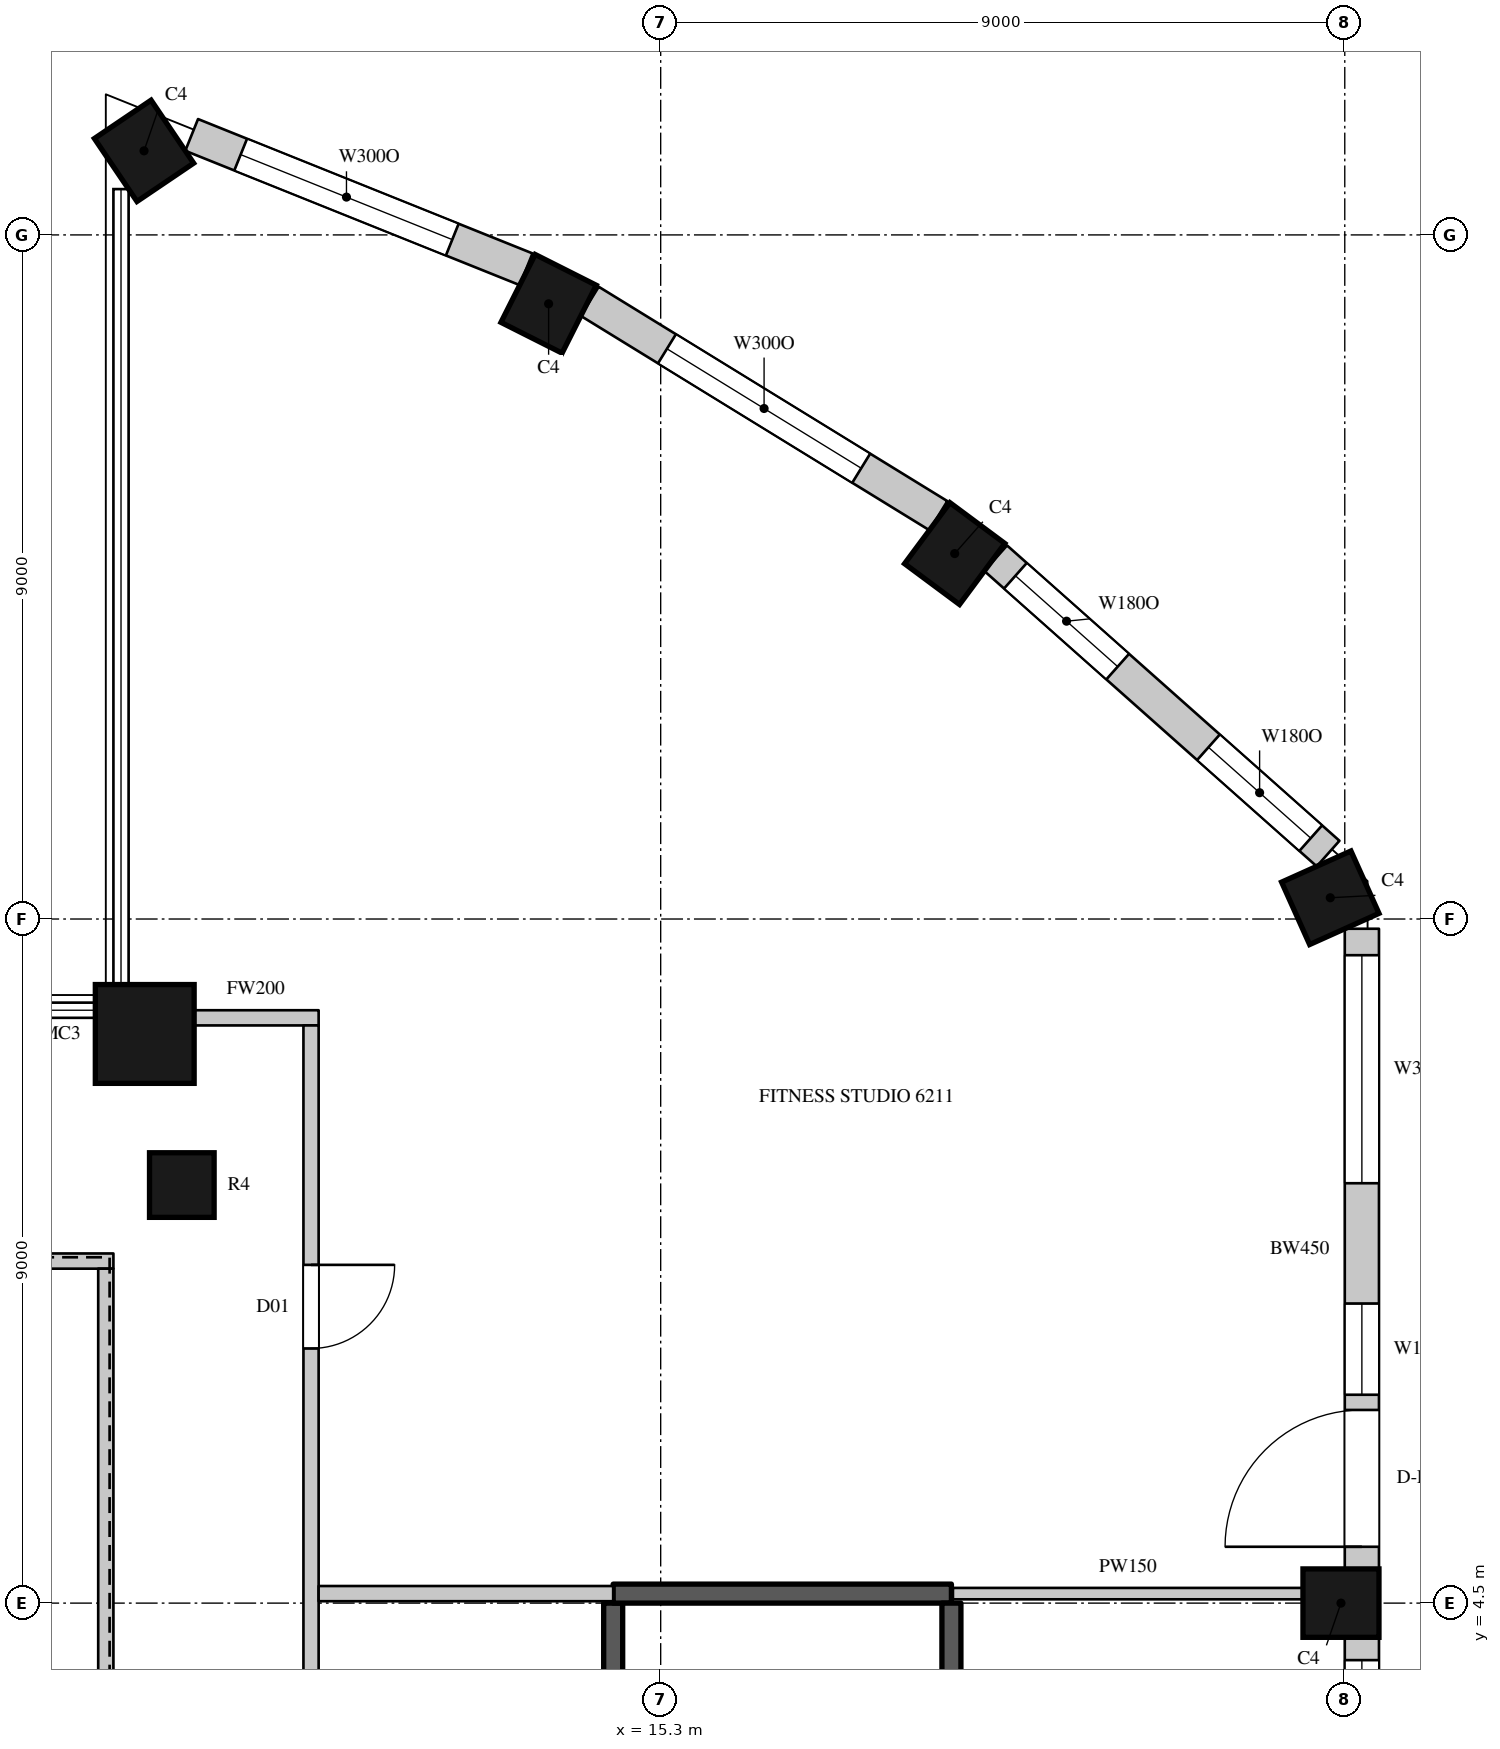
"""IFC4 building model, lengths in metres.
Left out: names, types, materials, properties, quantities, classifications, styles, units other than length and angle.
Written with IfcOpenShell. Run it as: python <this file> out.ifc"""

import sys

from ifc_helpers import new_model, si_unit, direction, frame, frame_2d, origin, origin_2d, place, context, subcontext, project, spatial, rectangle, circle, extrude, element, fill, save


model = new_model("IFC4")
c1 = context("Model", 3, precision=1e-05, world=origin(), true_north=direction((0.0, 1.0)))
c2 = subcontext(c1, "Body", "Model", "MODEL_VIEW")
j1 = project(units=[si_unit("LENGTHUNIT", "METRE"), si_unit("PLANEANGLEUNIT", "RADIAN")], contexts=[c1])
p1 = place(None, origin())
s1 = spatial("IfcSite", under=j1, at=p1, CompositionType="ELEMENT")
p2 = place(p1, origin())
s2 = spatial("IfcBuilding", under=s1, at=p2, CompositionType="ELEMENT")
p3 = place(p2, frame((0.0, 0.0, 276.2)))
s3 = spatial("IfcBuildingStorey", under=s2, at=p3, CompositionType="ELEMENT", Elevation=276.2)
p4 = place(p3, frame((8.503, 23.606, 0.0), z_axis=(0.0, 0.0, 1.0), x_axis=(-0.828469606019, -0.560034027451, 0.0)))
e1 = element("IfcColumn", 1, at=p4, inside=s3, PredefinedType="COLUMN", context=c2, shape_type="SweptSolid", body=[
    extrude(rectangle(XDim=0.9, YDim=1.0, at=origin_2d()), origin(), (0.0, 0.0, 1.0), 4.1),
])
p5 = place(p3, frame((8.512, 11.988, 0.0), z_axis=(0.0, 0.0, 1.0), x_axis=(1.0, 0.0, 0.0)))
e2 = element("IfcColumn", 2, at=p5, inside=s3, PredefinedType="COLUMN", context=c2, shape_type="SweptSolid", body=[
    extrude(circle(Radius=0.65, at=origin_2d()), origin(), (0.0, 0.0, 1.0), 4.1),
])
for number, where, z_axis, x_axis in (
    (3, (24.25, 4.5, 0.0), (0.0, 0.0, 1.0), (0.0, 1.0, 0.0)),
    (4, (24.11, 13.78, 0.0), (0.0, 0.0, 1.0), (-0.41, 0.912, 0.0)),
    (5, (19.168, 18.308, 0.0), (0.0, 0.0, 1.0), (-0.803, 0.596, 0.0)),
    (6, (13.826, 21.594, 0.0), (0.0, 0.0, 1.0), (-0.893, 0.45, 0.0)),
):
    element("IfcColumn", number, at=place(p3, frame(where, z_axis=z_axis, x_axis=x_axis)), inside=s3, PredefinedType="COLUMN", context=c2, shape_type="SweptSolid", body=[
        extrude(rectangle(XDim=0.9, YDim=1.0, at=origin_2d()), origin(), (0.0, 0.0, 1.0), 4.1),
    ])
p6 = place(p3, frame((9.0, 10.0, 0.0), z_axis=(0.0, 0.0, 1.0), x_axis=(1.0, 0.0, 0.0)))
e7 = element("IfcColumn", 7, at=p6, inside=s3, PredefinedType="COLUMN", context=c2, shape_type="SweptSolid", body=[
    extrude(circle(Radius=0.425, at=origin_2d()), origin(), (0.0, 0.0, 1.0), 4.1),
])
p7 = place(p3, frame((24.525, -4.05, 0.0), z_axis=(0.0, 0.0, 1.0), x_axis=(0.0, 1.0, 0.0)))
e8 = element("IfcWall", 8, at=p7, inside=s3, PredefinedType="SOLIDWALL", context=c2, shape_type="SweptSolid", body=[
    extrude(rectangle(XDim=8.1, YDim=0.45, at=frame_2d((4.05, 0.0))), origin(), (0.0, 0.0, 1.0), 3.8),
])
p8 = place(p7, frame((0.3, 0.0, 1.05)))
e9 = element("IfcOpeningElement", 9, at=p8, cuts=e8, PredefinedType="OPENING", context=c2, shape_type="SweptSolid", body=[
    extrude(rectangle(XDim=3.0, YDim=2.4, at=frame_2d((1.5, 1.2))), frame((0.0, 0.235, 0.0), z_axis=(0.0, -1.0, 0.0), x_axis=(1.0, 0.0, 0.0)), (0.0, 0.0, 1.0), 0.47),
])
p9 = place(p7, frame((4.8, 0.0, 1.05)))
e10 = element("IfcOpeningElement", 10, at=p9, cuts=e8, PredefinedType="OPENING", context=c2, shape_type="SweptSolid", body=[
    extrude(rectangle(XDim=3.0, YDim=2.4, at=frame_2d((1.5, 1.2))), frame((0.0, 0.235, 0.0), z_axis=(0.0, -1.0, 0.0), x_axis=(1.0, 0.0, 0.0)), (0.0, 0.0, 1.0), 0.47),
])
p10 = place(p3, frame((24.525, 4.95, 0.0), z_axis=(0.0, 0.0, 1.0), x_axis=(0.0, 1.0, 0.0)))
e11 = element("IfcWall", 11, at=p10, inside=s3, PredefinedType="SOLIDWALL", context=c2, shape_type="SweptSolid", body=[
    extrude(rectangle(XDim=8.422, YDim=0.45, at=frame_2d((4.211, 0.0))), origin(), (0.0, 0.0, 1.0), 3.8),
])
p11 = place(p10, frame((0.291, 0.0, 0.0)))
e12 = element("IfcOpeningElement", 12, at=p11, cuts=e11, PredefinedType="OPENING", context=c2, shape_type="SweptSolid", body=[
    extrude(rectangle(XDim=1.8, YDim=2.4, at=frame_2d((0.9, 1.2))), frame((0.0, 0.235, 0.0), z_axis=(0.0, -1.0, 0.0), x_axis=(1.0, 0.0, 0.0)), (0.0, 0.0, 1.0), 0.47),
])
p12 = place(p10, frame((2.291, 0.0, 1.05)))
e13 = element("IfcOpeningElement", 13, at=p12, cuts=e11, PredefinedType="OPENING", context=c2, shape_type="SweptSolid", body=[
    extrude(rectangle(XDim=1.2, YDim=2.4, at=frame_2d((0.6, 1.2))), frame((0.0, 0.235, 0.0), z_axis=(0.0, -1.0, 0.0), x_axis=(1.0, 0.0, 0.0)), (0.0, 0.0, 1.0), 0.47),
])
p13 = place(p10, frame((5.074, 0.0, 1.05)))
e14 = element("IfcOpeningElement", 14, at=p13, cuts=e11, PredefinedType="OPENING", context=c2, shape_type="SweptSolid", body=[
    extrude(rectangle(XDim=3.0, YDim=2.4, at=frame_2d((1.5, 1.2))), frame((0.0, 0.235, 0.0), z_axis=(0.0, -1.0, 0.0), x_axis=(1.0, 0.0, 0.0)), (0.0, 0.0, 1.0), 0.47),
])
p14 = place(p3, frame((24.081, 14.361, 0.0), z_axis=(0.0, 0.0, 1.0), x_axis=(-0.747570482973, 0.664182484704, 0.0)))
e15 = element("IfcWall", 15, at=p14, inside=s3, PredefinedType="SOLIDWALL", context=c2, shape_type="SweptSolid", body=[
    extrude(rectangle(XDim=5.85, YDim=0.45, at=frame_2d((2.925, 0.0))), origin(), (0.0, 0.0, 1.0), 3.8),
])
p15 = place(p14, frame((0.305, 0.0, 1.05)))
e16 = element("IfcOpeningElement", 16, at=p15, cuts=e15, PredefinedType="OPENING", context=c2, shape_type="SweptSolid", body=[
    extrude(rectangle(XDim=1.8, YDim=2.4, at=frame_2d((0.9, 1.2))), frame((0.0, 0.235, 0.0), z_axis=(0.0, -1.0, 0.0), x_axis=(1.0, 0.0, 0.0)), (0.0, 0.0, 1.0), 0.47),
])
p16 = place(p14, frame((3.703, 0.0, 1.05)))
e17 = element("IfcOpeningElement", 17, at=p16, cuts=e15, PredefinedType="OPENING", context=c2, shape_type="SweptSolid", body=[
    extrude(rectangle(XDim=1.8, YDim=2.4, at=frame_2d((0.9, 1.2))), frame((0.0, 0.235, 0.0), z_axis=(0.0, -1.0, 0.0), x_axis=(1.0, 0.0, 0.0)), (0.0, 0.0, 1.0), 0.47),
])
p17 = place(p3, frame((18.953, 18.806, 0.0), z_axis=(0.0, 0.0, 1.0), x_axis=(-0.851860664503, 0.523768468193, 0.0)))
e18 = element("IfcWall", 18, at=p17, inside=s3, PredefinedType="SOLIDWALL", context=c2, shape_type="SweptSolid", body=[
    extrude(rectangle(XDim=5.384, YDim=0.45, at=frame_2d((2.692, 0.0))), origin(), (0.0, 0.0, 1.0), 3.8),
])
p18 = place(p17, frame((1.192, 0.0, 1.05)))
e19 = element("IfcOpeningElement", 19, at=p18, cuts=e18, PredefinedType="OPENING", context=c2, shape_type="SweptSolid", body=[
    extrude(rectangle(XDim=3.0, YDim=2.4, at=frame_2d((1.5, 1.2))), frame((0.0, 0.235, 0.0), z_axis=(0.0, -1.0, 0.0), x_axis=(1.0, 0.0, 0.0)), (0.0, 0.0, 1.0), 0.47),
])
p19 = place(p3, frame((13.529, 22.048, 0.0), z_axis=(0.0, 0.0, 1.0), x_axis=(-0.927957332619, 0.372686448424, 0.0)))
e20 = element("IfcWall", 20, at=p19, inside=s3, PredefinedType="SOLIDWALL", context=c2, shape_type="SweptSolid", body=[
    extrude(rectangle(XDim=4.741, YDim=0.45, at=frame_2d((2.371, 0.0))), origin(), (0.0, 0.0, 1.0), 3.8),
])
p20 = place(p19, frame((1.047, 0.0, 1.05)))
e21 = element("IfcOpeningElement", 21, at=p20, cuts=e20, PredefinedType="OPENING", context=c2, shape_type="SweptSolid", body=[
    extrude(rectangle(XDim=3.0, YDim=2.4, at=frame_2d((1.5, 1.2))), frame((0.0, 0.235, 0.0), z_axis=(0.0, -1.0, 0.0), x_axis=(1.0, 0.0, 0.0)), (0.0, 0.0, 1.0), 0.47),
])
p21 = place(p3, frame((-6.1, 9.0, 0.0), z_axis=(0.0, 0.0, 1.0), x_axis=(1.0, 0.0, 0.0)))
e22 = element("IfcWall", 22, at=p21, inside=s3, PredefinedType="PARTITIONING", context=c2, shape_type="SweptSolid", body=[
    extrude(rectangle(XDim=14.2, YDim=0.2, at=frame_2d((7.1, 0.0))), origin(), (0.0, 0.0, 1.0), 3.8),
])
p22 = place(p3, frame((8.0, -4.48, 0.0), z_axis=(0.0, 0.0, 1.0), x_axis=(0.0, 1.0, 0.0)))
e23 = element("IfcWall", 23, at=p22, inside=s3, PredefinedType="PARTITIONING", context=c2, shape_type="SweptSolid", body=[
    extrude(rectangle(XDim=13.38, YDim=0.2, at=frame_2d((6.69, 0.0))), origin(), (0.0, 0.0, 1.0), 3.8),
])
p23 = place(p3, frame((9.144, 12.2, 0.0), z_axis=(0.0, 0.0, 1.0), x_axis=(1.0, 0.0, 0.0)))
e24 = element("IfcWall", 24, at=p23, inside=s3, PredefinedType="PARTITIONING", context=c2, shape_type="SweptSolid", body=[
    extrude(rectangle(XDim=1.656, YDim=0.2, at=frame_2d((0.828, 0.0))), origin(), (0.0, 0.0, 1.0), 3.8),
])
p24 = place(p3, frame((10.7, -11.7, 0.0), z_axis=(0.0, 0.0, 1.0), x_axis=(0.0, 1.0, 0.0)))
e25 = element("IfcWall", 25, at=p24, inside=s3, PredefinedType="PARTITIONING", context=c2, shape_type="SweptSolid", body=[
    extrude(rectangle(XDim=23.8, YDim=0.2, at=frame_2d((11.9, 0.0))), origin(), (0.0, 0.0, 1.0), 3.8),
])
p25 = place(p24, frame((12.35, 0.0, 0.0)))
e26 = element("IfcOpeningElement", 26, at=p25, cuts=e25, PredefinedType="OPENING", context=c2, shape_type="SweptSolid", body=[
    extrude(rectangle(XDim=1.5, YDim=2.4, at=frame_2d((0.75, 1.2))), frame((0.0, 0.11, 0.0), z_axis=(0.0, -1.0, 0.0), x_axis=(1.0, 0.0, 0.0)), (0.0, 0.0, 1.0), 0.22),
])
p26 = place(p24, frame((19.55, 0.0, 0.0)))
e27 = element("IfcOpeningElement", 27, at=p26, cuts=e25, PredefinedType="OPENING", context=c2, shape_type="SweptSolid", body=[
    extrude(rectangle(XDim=1.1, YDim=2.4, at=frame_2d((0.55, 1.2))), frame((0.0, 0.11, 0.0), z_axis=(0.0, -1.0, 0.0), x_axis=(1.0, 0.0, 0.0)), (0.0, 0.0, 1.0), 0.22),
])
p27 = place(p24, frame((4.25, 0.0, 0.0)))
e28 = element("IfcOpeningElement", 28, at=p27, cuts=e25, PredefinedType="OPENING", context=c2, shape_type="SweptSolid", body=[
    extrude(rectangle(XDim=1.1, YDim=2.4, at=frame_2d((0.55, 1.2))), frame((0.0, 0.11, 0.0), z_axis=(0.0, -1.0, 0.0), x_axis=(1.0, 0.0, 0.0)), (0.0, 0.0, 1.0), 0.22),
])
p28 = place(p3, frame((10.8, 4.625, 0.0), z_axis=(0.0, 0.0, 1.0), x_axis=(1.0, 0.0, 0.0)))
e29 = element("IfcWall", 29, at=p28, inside=s3, PredefinedType="PARTITIONING", context=c2, shape_type="SweptSolid", body=[
    extrude(rectangle(XDim=3.875, YDim=0.2, at=frame_2d((1.938, 0.0))), origin(), (0.0, 0.0, 1.0), 3.8),
])
p29 = place(p3, frame((19.145, 4.625, 0.0), z_axis=(0.0, 0.0, 1.0), x_axis=(1.0, 0.0, 0.0)))
e30 = element("IfcWall", 30, at=p29, inside=s3, PredefinedType="PARTITIONING", context=c2, shape_type="SweptSolid", body=[
    extrude(rectangle(XDim=4.605, YDim=0.15, at=frame_2d((2.302, 0.0))), origin(), (0.0, 0.0, 1.0), 3.8),
])
p30 = place(p3, frame((14.675, -4.5, 0.0), z_axis=(0.0, 0.0, 1.0), x_axis=(0.0, 1.0, 0.0)))
e31 = element("IfcWall", 31, at=p30, inside=s3, PredefinedType="SHEAR", context=c2, shape_type="SweptSolid", body=[
    extrude(rectangle(XDim=9.0, YDim=0.25, at=frame_2d((4.5, 0.0))), origin(), (0.0, 0.0, 1.0), 3.8),
])
p31 = place(p30, frame((0.45, 0.0, 0.0)))
e32 = element("IfcOpeningElement", 32, at=p31, cuts=e31, PredefinedType="OPENING", context=c2, shape_type="SweptSolid", body=[
    extrude(rectangle(XDim=1.1, YDim=2.2, at=frame_2d((0.55, 1.1))), frame((0.0, 0.135, 0.0), z_axis=(0.0, -1.0, 0.0), x_axis=(1.0, 0.0, 0.0)), (0.0, 0.0, 1.0), 0.27),
])
p32 = place(p3, frame((14.675, 4.625, 0.0), z_axis=(0.0, 0.0, 1.0), x_axis=(1.0, 0.0, 0.0)))
e33 = element("IfcWall", 33, at=p32, inside=s3, PredefinedType="SHEAR", context=c2, shape_type="SweptSolid", body=[
    extrude(rectangle(XDim=4.45, YDim=0.25, at=frame_2d((2.225, 0.0))), origin(), (0.0, 0.0, 1.0), 3.8),
])
p33 = place(p3, frame((19.125, -4.5, 0.0), z_axis=(0.0, 0.0, 1.0), x_axis=(0.0, 1.0, 0.0)))
e34 = element("IfcWall", 34, at=p33, inside=s3, PredefinedType="SHEAR", context=c2, shape_type="SweptSolid", body=[
    extrude(rectangle(XDim=9.0, YDim=0.25, at=frame_2d((4.5, 0.0))), origin(), (0.0, 0.0, 1.0), 3.8),
])
p34 = place(p9, origin())
e35 = element("IfcWindow", 35, at=p34, inside=s3, PartitioningType="SINGLE_PANEL", PredefinedType="WINDOW", context=c2, shape_type="SweptSolid", body=[
    extrude(rectangle(XDim=3.0, YDim=2.4, at=frame_2d((1.5, 1.2))), frame((0.0, 0.135, 0.0), z_axis=(0.0, -1.0, 0.0), x_axis=(1.0, 0.0, 0.0)), (0.0, 0.0, 1.0), 0.06),
])
fill(e10, e35)
p35 = place(p11, origin())
e36 = element("IfcDoor", 36, at=p35, inside=s3, OperationType="SLIDING_TO_LEFT", PredefinedType="DOOR", context=c2, shape_type="SweptSolid", body=[
    extrude(rectangle(XDim=1.8, YDim=2.4, at=frame_2d((0.9, 1.2))), frame((0.0, 0.13, 0.0), z_axis=(0.0, -1.0, 0.0), x_axis=(1.0, 0.0, 0.0)), (0.0, 0.0, 1.0), 0.05),
])
fill(e12, e36)
p36 = place(p12, origin())
e37 = element("IfcWindow", 37, at=p36, inside=s3, PartitioningType="SINGLE_PANEL", PredefinedType="WINDOW", context=c2, shape_type="SweptSolid", body=[
    extrude(rectangle(XDim=1.2, YDim=2.4, at=frame_2d((0.6, 1.2))), frame((0.0, 0.135, 0.0), z_axis=(0.0, -1.0, 0.0), x_axis=(1.0, 0.0, 0.0)), (0.0, 0.0, 1.0), 0.06),
])
fill(e13, e37)
p37 = place(p13, origin())
e38 = element("IfcWindow", 38, at=p37, inside=s3, PartitioningType="SINGLE_PANEL", PredefinedType="WINDOW", context=c2, shape_type="SweptSolid", body=[
    extrude(rectangle(XDim=3.0, YDim=2.4, at=frame_2d((1.5, 1.2))), frame((0.0, 0.135, 0.0), z_axis=(0.0, -1.0, 0.0), x_axis=(1.0, 0.0, 0.0)), (0.0, 0.0, 1.0), 0.06),
])
fill(e14, e38)
p38 = place(p15, origin())
e39 = element("IfcWindow", 39, at=p38, inside=s3, PartitioningType="SINGLE_PANEL", PredefinedType="WINDOW", context=c2, shape_type="SweptSolid", body=[
    extrude(rectangle(XDim=1.8, YDim=2.4, at=frame_2d((0.9, 1.2))), frame((0.0, 0.135, 0.0), z_axis=(0.0, -1.0, 0.0), x_axis=(1.0, 0.0, 0.0)), (0.0, 0.0, 1.0), 0.06),
])
fill(e16, e39)
p39 = place(p16, origin())
e40 = element("IfcWindow", 40, at=p39, inside=s3, PartitioningType="SINGLE_PANEL", PredefinedType="WINDOW", context=c2, shape_type="SweptSolid", body=[
    extrude(rectangle(XDim=1.8, YDim=2.4, at=frame_2d((0.9, 1.2))), frame((0.0, 0.135, 0.0), z_axis=(0.0, -1.0, 0.0), x_axis=(1.0, 0.0, 0.0)), (0.0, 0.0, 1.0), 0.06),
])
fill(e17, e40)
p40 = place(p18, origin())
e41 = element("IfcWindow", 41, at=p40, inside=s3, PartitioningType="SINGLE_PANEL", PredefinedType="WINDOW", context=c2, shape_type="SweptSolid", body=[
    extrude(rectangle(XDim=3.0, YDim=2.4, at=frame_2d((1.5, 1.2))), frame((0.0, 0.135, 0.0), z_axis=(0.0, -1.0, 0.0), x_axis=(1.0, 0.0, 0.0)), (0.0, 0.0, 1.0), 0.06),
])
fill(e19, e41)
p41 = place(p20, origin())
e42 = element("IfcWindow", 42, at=p41, inside=s3, PartitioningType="SINGLE_PANEL", PredefinedType="WINDOW", context=c2, shape_type="SweptSolid", body=[
    extrude(rectangle(XDim=3.0, YDim=2.4, at=frame_2d((1.5, 1.2))), frame((0.0, 0.135, 0.0), z_axis=(0.0, -1.0, 0.0), x_axis=(1.0, 0.0, 0.0)), (0.0, 0.0, 1.0), 0.06),
])
fill(e21, e42)
p42 = place(p26, origin())
e43 = element("IfcDoor", 43, at=p42, inside=s3, OperationType="SINGLE_SWING_LEFT", PredefinedType="DOOR", context=c2, shape_type="SweptSolid", body=[
    extrude(rectangle(XDim=1.1, YDim=2.4, at=frame_2d((0.55, 1.2))), frame((0.0, 0.025, 0.0), z_axis=(0.0, -1.0, 0.0), x_axis=(1.0, 0.0, 0.0)), (0.0, 0.0, 1.0), 0.05),
])
fill(e27, e43)
save(model, sys.argv[1])
